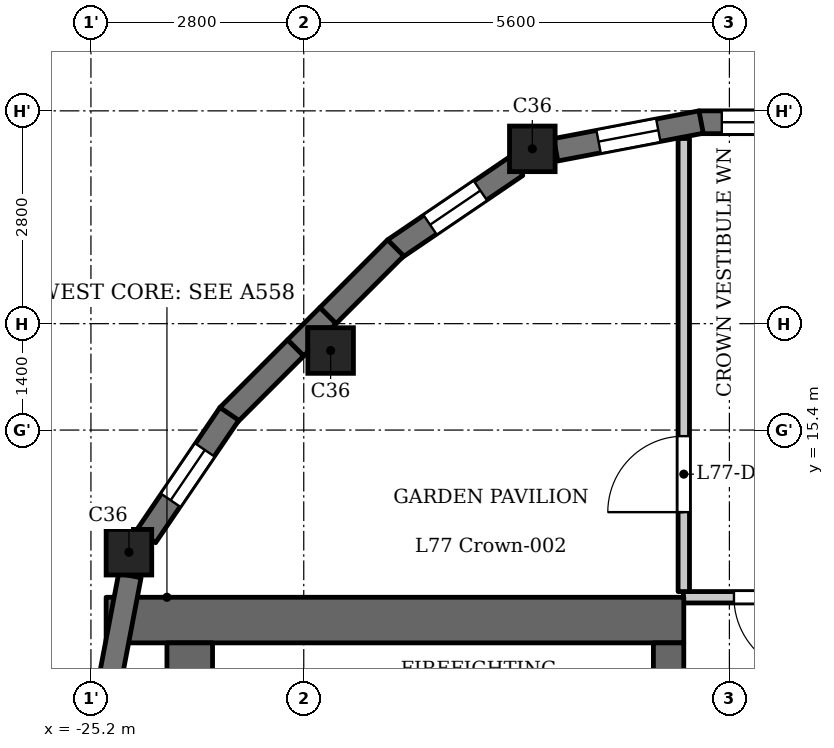
"""IFC4 building model, lengths in metres.
Left out: names, types, materials, properties, quantities, classifications, styles, units other than length and angle.
Written with IfcOpenShell. Run it as: python <this file> out.ifc"""

import sys

from ifc_helpers import new_model, si_unit, direction, frame, frame_2d, origin, origin_2d, place, context, subcontext, project, spatial, polyline, rectangle, outline, extrude, element, fill, save


model = new_model("IFC4")
c1 = context("Model", 3, precision=1e-05, world=origin(), true_north=direction((0.0, 1.0)))
c2 = subcontext(c1, "Body", "Model", "MODEL_VIEW")
j1 = project(units=[si_unit("LENGTHUNIT", "METRE"), si_unit("PLANEANGLEUNIT", "RADIAN")], contexts=[c1])
p1 = place(None, origin())
s1 = spatial("IfcSite", under=j1, at=p1, CompositionType="ELEMENT")
p2 = place(p1, origin())
s2 = spatial("IfcBuilding", under=s1, at=p2, CompositionType="ELEMENT")
p3 = place(p2, frame((0.0, 0.0, 299.9)))
s3 = spatial("IfcBuildingStorey", under=s2, at=p3, CompositionType="ELEMENT", Elevation=299.9)
for number, where, z_axis, x_axis in (
    (1, (-24.7, 13.793, 0.0), (0.0, 0.0, 1.0), (1.0, 0.0, 0.0)),
    (2, (-22.046, 16.446, 0.0), (0.0, 0.0, 1.0), (1.0, 0.0, 0.0)),
    (3, (-19.393, 19.1, 0.0), (0.0, 0.0, 1.0), (1.0, 0.0, 0.0)),
):
    element("IfcColumn", number, at=place(p3, frame(where, z_axis=z_axis, x_axis=x_axis)), inside=s3, PredefinedType="COLUMN", context=c2, shape_type="SweptSolid", body=[
        extrude(rectangle(XDim=0.6, YDim=0.6, at=origin_2d()), origin(), (0.0, 0.0, 1.0), 3.5),
    ])
p4 = place(p3, frame((-15.8, 19.45, 0.0), z_axis=(0.0, 0.0, 1.0), x_axis=(-1.0, 0.0, 0.0)))
e4 = element("IfcWall", 4, at=p4, inside=s3, PredefinedType="SOLIDWALL", context=c2, shape_type="SweptSolid", body=[
    extrude(rectangle(XDim=1.4, YDim=0.3, at=frame_2d((0.7, 0.0))), origin(), (0.0, 0.0, 1.0), 3.2),
])
p5 = place(p4, frame((0.3, 0.0, 0.6)))
e5 = element("IfcOpeningElement", 5, at=p5, cuts=e4, PredefinedType="OPENING", context=c2, shape_type="SweptSolid", body=[
    extrude(rectangle(XDim=0.8, YDim=1.55, at=frame_2d((0.4, 0.775))), frame((0.0, 0.16, 0.0), z_axis=(0.0, -1.0, 0.0), x_axis=(1.0, 0.0, 0.0)), (0.0, 0.0, 1.0), 0.32),
])
p6 = place(p3, frame((-17.172, 19.453, 0.0), z_axis=(0.0, 0.0, 1.0), x_axis=(-0.982286967073, -0.187382801553, 0.0)))
e6 = element("IfcWall", 6, at=p6, inside=s3, PredefinedType="SOLIDWALL", context=c2, shape_type="SweptSolid", body=[
    extrude(rectangle(XDim=1.948, YDim=0.3, at=frame_2d((0.974, 0.0))), origin(), (0.0, 0.0, 1.0), 2.6),
])
p7 = place(p6, frame((0.574, 0.0, 0.6)))
e7 = element("IfcOpeningElement", 7, at=p7, cuts=e6, PredefinedType="OPENING", context=c2, shape_type="SweptSolid", body=[
    extrude(rectangle(XDim=0.8, YDim=1.55, at=frame_2d((0.4, 0.775))), frame((0.0, 0.16, 0.0), z_axis=(0.0, -1.0, 0.0), x_axis=(1.0, 0.0, 0.0)), (0.0, 0.0, 1.0), 0.32),
])
p8 = place(p3, frame((-19.602, 18.874, 0.0), z_axis=(0.0, 0.0, 1.0), x_axis=(-0.827022075481, -0.562169446579, 0.0)))
e8 = element("IfcWall", 8, at=p8, inside=s3, PredefinedType="SOLIDWALL", context=c2, shape_type="SweptSolid", body=[
    extrude(rectangle(XDim=1.948, YDim=0.3, at=frame_2d((0.974, 0.0))), origin(), (0.0, 0.0, 1.0), 2.6),
])
p9 = place(p8, frame((0.574, 0.0, 0.6)))
e9 = element("IfcOpeningElement", 9, at=p9, cuts=e8, PredefinedType="OPENING", context=c2, shape_type="SweptSolid", body=[
    extrude(rectangle(XDim=0.8, YDim=1.55, at=frame_2d((0.4, 0.775))), frame((0.0, 0.16, 0.0), z_axis=(0.0, -1.0, 0.0), x_axis=(1.0, 0.0, 0.0)), (0.0, 0.0, 1.0), 0.32),
])
for number, where, z_axis, x_axis in (
    (10, (-21.191, 17.797, 0.0), (0.0, 0.0, 1.0), (-0.707, -0.707, 0.0)),
    (11, (-22.506, 16.482, 0.0), (0.0, 0.0, 1.0), (-0.707, -0.707, 0.0)),
):
    element("IfcWall", number, at=place(p3, frame(where, z_axis=z_axis, x_axis=x_axis)), inside=s3, PredefinedType="SOLIDWALL", context=c2, shape_type="SweptSolid", body=[
        extrude(rectangle(XDim=1.26, YDim=0.3, at=frame_2d((0.63, 0.0))), origin(), (0.0, 0.0, 1.0), 3.2),
    ])
p10 = place(p3, frame((-23.379, 15.613, 0.0), z_axis=(0.0, 0.0, 1.0), x_axis=(-0.562025435703, -0.827119948752, 0.0)))
e12 = element("IfcWall", 12, at=p10, inside=s3, PredefinedType="SOLIDWALL", context=c2, shape_type="SweptSolid", body=[
    extrude(rectangle(XDim=1.948, YDim=0.3, at=frame_2d((0.974, 0.0))), origin(), (0.0, 0.0, 1.0), 2.6),
])
p11 = place(p10, frame((0.574, 0.0, 0.6)))
e13 = element("IfcOpeningElement", 13, at=p11, cuts=e12, PredefinedType="OPENING", context=c2, shape_type="SweptSolid", body=[
    extrude(rectangle(XDim=0.8, YDim=1.55, at=frame_2d((0.4, 0.775))), frame((0.0, 0.16, 0.0), z_axis=(0.0, -1.0, 0.0), x_axis=(1.0, 0.0, 0.0)), (0.0, 0.0, 1.0), 0.32),
])
p12 = place(p3, frame((-24.688, 13.485, 0.0), z_axis=(0.0, 0.0, 1.0), x_axis=(-0.187354129902, -0.982292436095, 0.0)))
e14 = element("IfcWall", 14, at=p12, inside=s3, PredefinedType="SOLIDWALL", context=c2, shape_type="SweptSolid", body=[
    extrude(rectangle(XDim=1.947, YDim=0.3, at=frame_2d((0.973, 0.0))), origin(), (0.0, 0.0, 1.0), 2.6),
])
p13 = place(p3, frame((-17.4, 12.9, 0.0), z_axis=(0.0, 0.0, 1.0), x_axis=(-1.0, 0.0, 0.0)))
e15 = element("IfcWall", 15, at=p13, inside=s3, PredefinedType="SHEAR", context=c2, shape_type="SweptSolid", body=[
    extrude(rectangle(XDim=7.6, YDim=0.6, at=frame_2d((3.8, 0.0))), origin(), (0.0, 0.0, 1.0), 3.2),
])
p14 = place(p3, frame((-17.6, -12.6, 0.0), z_axis=(0.0, 0.0, 1.0), x_axis=(0.0, 1.0, 0.0)))
e16 = element("IfcWall", 16, at=p14, inside=s3, PredefinedType="SHEAR", context=c2, shape_type="SweptSolid", body=[
    extrude(rectangle(XDim=25.2, YDim=0.4, at=frame_2d((12.6, 0.0))), origin(), (0.0, 0.0, 1.0), 3.2),
])
p15 = place(p14, frame((11.2, 0.0, 0.0)))
e17 = element("IfcOpeningElement", 17, at=p15, cuts=e16, PredefinedType="OPENING", context=c2, shape_type="SweptSolid", body=[
    extrude(rectangle(XDim=0.9, YDim=2.1, at=frame_2d((0.45, 1.05))), frame((0.0, 0.21, 0.0), z_axis=(0.0, -1.0, 0.0), x_axis=(1.0, 0.0, 0.0)), (0.0, 0.0, 1.0), 0.42),
])
p16 = place(p14, frame((17.05, 0.0, 0.0)))
e18 = element("IfcOpeningElement", 18, at=p16, cuts=e16, PredefinedType="OPENING", context=c2, shape_type="SweptSolid", body=[
    extrude(rectangle(XDim=0.9, YDim=2.1, at=frame_2d((0.45, 1.05))), frame((0.0, 0.21, 0.0), z_axis=(0.0, -1.0, 0.0), x_axis=(1.0, 0.0, 0.0)), (0.0, 0.0, 1.0), 0.42),
])
p17 = place(p14, frame((23.25, 0.0, 0.0)))
e19 = element("IfcOpeningElement", 19, at=p17, cuts=e16, PredefinedType="OPENING", context=c2, shape_type="SweptSolid", body=[
    extrude(rectangle(XDim=1.1, YDim=2.1, at=frame_2d((0.55, 1.05))), frame((0.0, 0.21, 0.0), z_axis=(0.0, -1.0, 0.0), x_axis=(1.0, 0.0, 0.0)), (0.0, 0.0, 1.0), 0.42),
])
p18 = place(p14, frame((0.85, 0.0, 0.0)))
e20 = element("IfcOpeningElement", 20, at=p18, cuts=e16, PredefinedType="OPENING", context=c2, shape_type="SweptSolid", body=[
    extrude(rectangle(XDim=1.1, YDim=2.1, at=frame_2d((0.55, 1.05))), frame((0.0, 0.21, 0.0), z_axis=(0.0, -1.0, 0.0), x_axis=(1.0, 0.0, 0.0)), (0.0, 0.0, 1.0), 0.42),
])
p19 = place(p14, frame((13.075, 0.0, 0.0)))
e21 = element("IfcOpeningElement", 21, at=p19, cuts=e16, PredefinedType="OPENING", context=c2, shape_type="SweptSolid", body=[
    extrude(rectangle(XDim=1.8, YDim=2.1, at=frame_2d((0.9, 1.05))), frame((0.0, 0.21, 0.0), z_axis=(0.0, -1.0, 0.0), x_axis=(1.0, 0.0, 0.0)), (0.0, 0.0, 1.0), 0.42),
])
p20 = place(p3, frame((-23.9, -12.6, 0.0), z_axis=(0.0, 0.0, 1.0), x_axis=(0.0, 1.0, 0.0)))
e22 = element("IfcWall", 22, at=p20, inside=s3, PredefinedType="SHEAR", context=c2, shape_type="SweptSolid", body=[
    extrude(rectangle(XDim=25.2, YDim=0.6, at=frame_2d((12.6, 0.0))), origin(), (0.0, 0.0, 1.0), 3.2),
])
p21 = place(p3, frame((-17.405, 13.2, 0.0), z_axis=(0.0, 0.0, 1.0), x_axis=(1.0, 0.0, 0.0)))
e23 = element("IfcWall", 23, at=p21, inside=s3, PredefinedType="PARTITIONING", context=c2, shape_type="SweptSolid", body=[
    extrude(rectangle(XDim=2.085, YDim=0.15, at=frame_2d((1.042, 0.0))), origin(), (0.0, 0.0, 1.0), 3.2),
])
p22 = place(p21, frame((0.665, 0.0, 0.0)))
e24 = element("IfcOpeningElement", 24, at=p22, cuts=e23, PredefinedType="OPENING", context=c2, shape_type="SweptSolid", body=[
    extrude(rectangle(XDim=1.0, YDim=2.1, at=frame_2d((0.5, 1.05))), frame((0.0, 0.085, 0.0), z_axis=(0.0, -1.0, 0.0), x_axis=(1.0, 0.0, 0.0)), (0.0, 0.0, 1.0), 0.17),
])
p23 = place(p3, frame((-17.4, 13.275, 0.0), z_axis=(0.0, 0.0, 1.0), x_axis=(0.0, 1.0, 0.0)))
e25 = element("IfcWall", 25, at=p23, inside=s3, PredefinedType="PARTITIONING", context=c2, shape_type="SweptSolid", body=[
    extrude(rectangle(XDim=5.961, YDim=0.15, at=frame_2d((2.981, 0.0))), origin(), (0.0, 0.0, 1.0), 3.2),
])
p24 = place(p23, frame((1.045, 0.0, 0.0)))
e26 = element("IfcOpeningElement", 26, at=p24, cuts=e25, PredefinedType="OPENING", context=c2, shape_type="SweptSolid", body=[
    extrude(rectangle(XDim=1.0, YDim=2.1, at=frame_2d((0.5, 1.05))), frame((0.0, 0.085, 0.0), z_axis=(0.0, -1.0, 0.0), x_axis=(1.0, 0.0, 0.0)), (0.0, 0.0, 1.0), 0.17),
])
p25 = place(p3, origin())
e27 = element("IfcWall", 27, at=p25, inside=s3, PredefinedType="SOLIDWALL", context=c2, shape_type="SweptSolid", body=[
    extrude(outline(polyline([(-21.976, 16.8), (-22.188, 17.012), (-22.612, 16.588), (-22.4, 16.376), (-22.346, 16.429), (-22.346, 16.746), (-22.029, 16.746), (-21.976, 16.8)])), origin(), (0.0, 0.0, 1.0), 3.2),
])
p26 = place(p22, origin())
e28 = element("IfcDoor", 28, at=p26, inside=s3, OperationType="SINGLE_SWING_RIGHT", PredefinedType="DOOR", context=c2, shape_type="SweptSolid", body=[
    extrude(rectangle(XDim=1.0, YDim=2.1, at=frame_2d((0.5, 1.05))), frame((0.0, 0.025, 0.0), z_axis=(0.0, -1.0, 0.0), x_axis=(1.0, 0.0, 0.0)), (0.0, 0.0, 1.0), 0.05),
])
fill(e24, e28)
p27 = place(p24, origin())
e29 = element("IfcDoor", 29, at=p27, inside=s3, OperationType="SINGLE_SWING_RIGHT", PredefinedType="DOOR", context=c2, shape_type="SweptSolid", body=[
    extrude(rectangle(XDim=1.0, YDim=2.1, at=frame_2d((0.5, 1.05))), frame((0.0, 0.025, 0.0), z_axis=(0.0, -1.0, 0.0), x_axis=(1.0, 0.0, 0.0)), (0.0, 0.0, 1.0), 0.05),
])
fill(e26, e29)
p28 = place(p5, origin())
e30 = element("IfcWindow", 30, at=p28, inside=s3, PartitioningType="SINGLE_PANEL", PredefinedType="WINDOW", context=c2, shape_type="SweptSolid", body=[
    extrude(rectangle(XDim=0.8, YDim=1.55, at=frame_2d((0.4, 0.775))), frame((0.0, 0.03, 0.0), z_axis=(0.0, -1.0, 0.0), x_axis=(1.0, 0.0, 0.0)), (0.0, 0.0, 1.0), 0.06),
])
fill(e5, e30)
p29 = place(p7, origin())
e31 = element("IfcWindow", 31, at=p29, inside=s3, PartitioningType="SINGLE_PANEL", PredefinedType="WINDOW", context=c2, shape_type="SweptSolid", body=[
    extrude(rectangle(XDim=0.8, YDim=1.55, at=frame_2d((0.4, 0.775))), frame((0.0, 0.03, 0.0), z_axis=(0.0, -1.0, 0.0), x_axis=(1.0, 0.0, 0.0)), (0.0, 0.0, 1.0), 0.06),
])
fill(e7, e31)
p30 = place(p9, origin())
e32 = element("IfcWindow", 32, at=p30, inside=s3, PartitioningType="SINGLE_PANEL", PredefinedType="WINDOW", context=c2, shape_type="SweptSolid", body=[
    extrude(rectangle(XDim=0.8, YDim=1.55, at=frame_2d((0.4, 0.775))), frame((0.0, 0.03, 0.0), z_axis=(0.0, -1.0, 0.0), x_axis=(1.0, 0.0, 0.0)), (0.0, 0.0, 1.0), 0.06),
])
fill(e9, e32)
p31 = place(p11, origin())
e33 = element("IfcWindow", 33, at=p31, inside=s3, PartitioningType="SINGLE_PANEL", PredefinedType="WINDOW", context=c2, shape_type="SweptSolid", body=[
    extrude(rectangle(XDim=0.8, YDim=1.55, at=frame_2d((0.4, 0.775))), frame((0.0, 0.03, 0.0), z_axis=(0.0, -1.0, 0.0), x_axis=(1.0, 0.0, 0.0)), (0.0, 0.0, 1.0), 0.06),
])
fill(e13, e33)
save(model, sys.argv[1])
